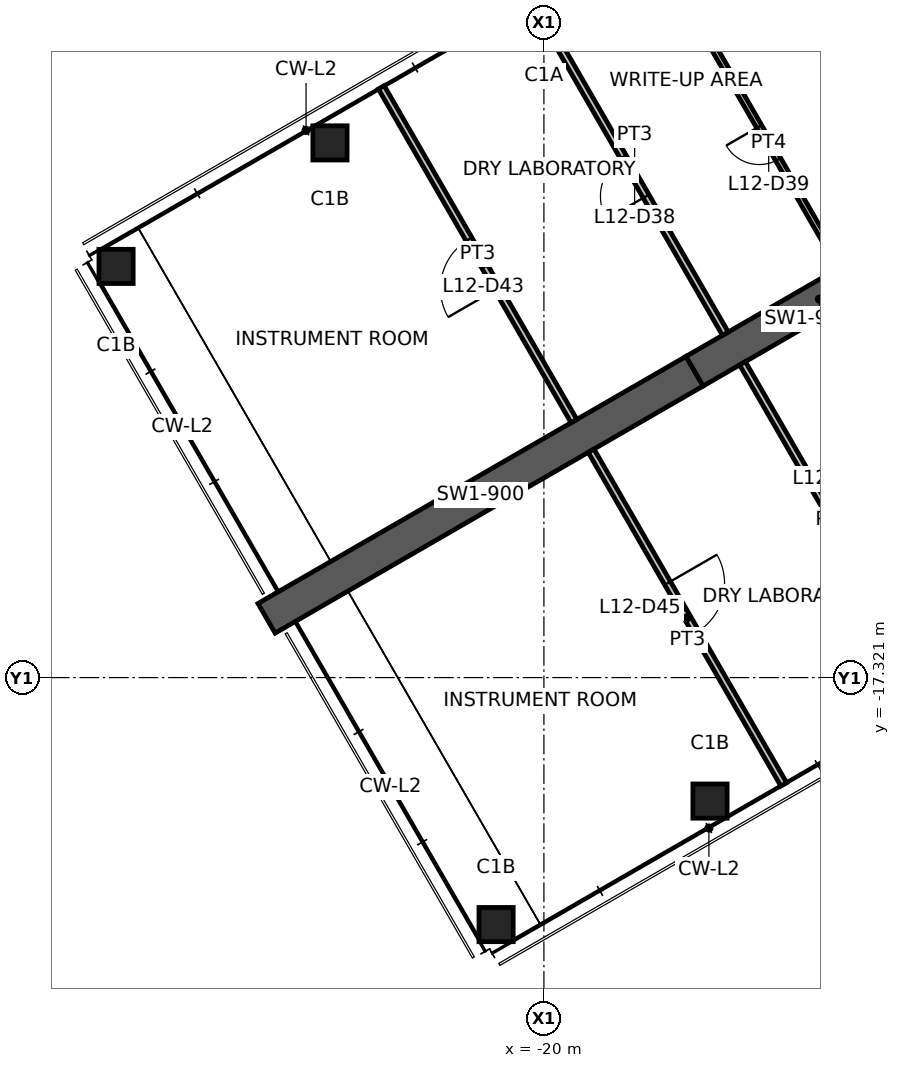
"""IFC4 building model, lengths in metres.
Left out: names, types, materials, properties, quantities, classifications, styles, units other than length and angle.
Written with IfcOpenShell. Run it as: python <this file> out.ifc"""

import sys

from ifc_helpers import new_model, si_unit, direction, frame, frame_2d, origin, origin_2d, place, context, subcontext, project, spatial, rectangle, hollow_rectangle, extrude, element, fill, save


model = new_model("IFC4")
c1 = context("Model", 3, precision=1e-05, world=origin(), true_north=direction((0.0, 1.0)))
c2 = subcontext(c1, "Body", "Model", "MODEL_VIEW")
j1 = project(units=[si_unit("LENGTHUNIT", "METRE"), si_unit("PLANEANGLEUNIT", "RADIAN")], contexts=[c1])
p1 = place(None, origin())
s1 = spatial("IfcSite", under=j1, at=p1, CompositionType="ELEMENT")
p2 = place(p1, origin())
s2 = spatial("IfcBuilding", under=s1, at=p2, CompositionType="ELEMENT")
p3 = place(p2, frame((0.0, 0.0, 47.8)))
s3 = spatial("IfcBuildingStorey", under=s2, at=p3, CompositionType="ELEMENT", Elevation=47.8)
for number, where, z_axis, x_axis in (
    (1, (-25.629, -3.25, 0.0), (0.0, 0.0, 1.0), (1.0, 0.0, 0.0)),
    (2, (-31.258, -6.5, 0.0), (0.0, 0.0, 1.0), (1.0, 0.0, 0.0)),
    (3, (-15.629, -20.571, 0.0), (0.0, 0.0, 1.0), (1.0, 0.0, 0.0)),
    (4, (-21.258, -23.821, 0.0), (0.0, 0.0, 1.0), (1.0, 0.0, 0.0)),
):
    element("IfcColumn", number, at=place(p3, frame(where, z_axis=z_axis, x_axis=x_axis)), inside=s3, PredefinedType="COLUMN", context=c2, shape_type="SweptSolid", body=[
        extrude(hollow_rectangle(XDim=0.9, YDim=0.9, WallThickness=0.05, at=origin_2d()), origin(), (0.0, 0.0, 1.0), 4.2),
    ])
p4 = place(p3, frame((-9.461, -5.462, 0.0), z_axis=(0.0, 0.0, 1.0), x_axis=(-0.866019116917, -0.500010889016, 0.0)))
e5 = element("IfcWall", 5, at=p4, inside=s3, PredefinedType="SHEAR", context=c2, shape_type="SweptSolid", body=[
    extrude(rectangle(XDim=7.595, YDim=0.9, at=frame_2d((3.798, 0.0))), origin(), (0.0, 0.0, 1.0), 4.2),
])
p5 = place(p4, frame((0.8, 0.0, 0.0)))
e6 = element("IfcOpeningElement", 6, at=p5, cuts=e5, PredefinedType="OPENING", context=c2, shape_type="SweptSolid", body=[
    extrude(rectangle(XDim=1.0, YDim=2.1, at=frame_2d((0.5, 1.05))), frame((0.0, 0.46, 0.0), z_axis=(0.0, -1.0, 0.0), x_axis=(1.0, 0.0, 0.0)), (0.0, 0.0, 1.0), 0.92),
])
p6 = place(p3, frame((-16.039, -9.26, 0.0), z_axis=(0.0, 0.0, 1.0), x_axis=(-0.866024837091, -0.50000098154, 0.0)))
e7 = element("IfcWall", 7, at=p6, inside=s3, PredefinedType="SHEAR", context=c2, shape_type="SweptSolid", body=[
    extrude(rectangle(XDim=13.0, YDim=0.9, at=frame_2d((6.5, 0.0))), origin(), (0.0, 0.0, 1.0), 4.2),
])
p7 = place(p3, frame((-15.225, -8.271, 0.0), z_axis=(0.0, 0.0, 1.0), x_axis=(-0.499993908199, 0.866028920859, 0.0)))
e8 = element("IfcWall", 8, at=p7, inside=s3, PredefinedType="PARTITIONING", context=c2, shape_type="SweptSolid", body=[
    extrude(rectangle(XDim=9.55, YDim=0.175, at=frame_2d((4.775, 0.0))), origin(), (0.0, 0.0, 1.0), 2.95),
])
p8 = place(p7, frame((4.175, 0.0, 0.0)))
e9 = element("IfcOpeningElement", 9, at=p8, cuts=e8, PredefinedType="OPENING", context=c2, shape_type="SweptSolid", body=[
    extrude(rectangle(XDim=1.2, YDim=2.1, at=frame_2d((0.6, 1.05))), frame((0.0, 0.098, 0.0), z_axis=(0.0, -1.0, 0.0), x_axis=(1.0, 0.0, 0.0)), (0.0, 0.0, 1.0), 0.195),
])
p9 = place(p3, frame((-12.208, -6.506, 0.0), z_axis=(0.0, 0.0, 1.0), x_axis=(-0.499984092097, 0.866034588021, 0.0)))
e10 = element("IfcWall", 10, at=p9, inside=s3, PredefinedType="PARTITIONING", context=c2, shape_type="SweptSolid", body=[
    extrude(rectangle(XDim=7.512, YDim=0.15, at=frame_2d((3.756, 0.0))), origin(), (0.0, 0.0, 1.0), 2.65),
])
p10 = place(p9, frame((3.256, 0.0, 0.0)))
e11 = element("IfcOpeningElement", 11, at=p10, cuts=e10, PredefinedType="OPENING", context=c2, shape_type="SweptSolid", body=[
    extrude(rectangle(XDim=1.0, YDim=2.1, at=frame_2d((0.5, 1.05))), frame((0.0, 0.085, 0.0), z_axis=(0.0, -1.0, 0.0), x_axis=(1.0, 0.0, 0.0)), (0.0, 0.0, 1.0), 0.17),
])
p11 = place(p3, frame((-19.209, -10.571, 0.0), z_axis=(0.0, 0.0, 1.0), x_axis=(-0.500005203629, 0.866022399447, 0.0)))
e12 = element("IfcWall", 12, at=p11, inside=s3, PredefinedType="PARTITIONING", context=c2, shape_type="SweptSolid", body=[
    extrude(rectangle(XDim=10.14, YDim=0.175, at=frame_2d((5.07, 0.0))), origin(), (0.0, 0.0, 1.0), 3.95),
])
p12 = place(p11, frame((4.025, 0.0, 0.0)))
e13 = element("IfcOpeningElement", 13, at=p12, cuts=e12, PredefinedType="OPENING", context=c2, shape_type="SweptSolid", body=[
    extrude(rectangle(XDim=1.5, YDim=2.1, at=frame_2d((0.75, 1.05))), frame((0.0, 0.098, 0.0), z_axis=(0.0, -1.0, 0.0), x_axis=(1.0, 0.0, 0.0)), (0.0, 0.0, 1.0), 0.195),
])
p13 = place(p3, frame((-14.775, -9.05, 0.0), z_axis=(0.0, 0.0, 1.0), x_axis=(0.499993908199, -0.866028920859, 0.0)))
e14 = element("IfcWall", 14, at=p13, inside=s3, PredefinedType="PARTITIONING", context=c2, shape_type="SweptSolid", body=[
    extrude(rectangle(XDim=9.55, YDim=0.175, at=frame_2d((4.775, 0.0))), origin(), (0.0, 0.0, 1.0), 2.95),
])
p14 = place(p13, frame((4.175, 0.0, 0.0)))
e15 = element("IfcOpeningElement", 15, at=p14, cuts=e14, PredefinedType="OPENING", context=c2, shape_type="SweptSolid", body=[
    extrude(rectangle(XDim=1.2, YDim=2.1, at=frame_2d((0.6, 1.05))), frame((0.0, 0.098, 0.0), z_axis=(0.0, -1.0, 0.0), x_axis=(1.0, 0.0, 0.0)), (0.0, 0.0, 1.0), 0.195),
])
p15 = place(p3, frame((-18.759, -11.35, 0.0), z_axis=(0.0, 0.0, 1.0), x_axis=(0.500005203629, -0.866022399447, 0.0)))
e16 = element("IfcWall", 16, at=p15, inside=s3, PredefinedType="PARTITIONING", context=c2, shape_type="SweptSolid", body=[
    extrude(rectangle(XDim=10.14, YDim=0.175, at=frame_2d((5.07, 0.0))), origin(), (0.0, 0.0, 1.0), 3.95),
])
p16 = place(p15, frame((4.025, 0.0, 0.0)))
e17 = element("IfcOpeningElement", 17, at=p16, cuts=e16, PredefinedType="OPENING", context=c2, shape_type="SweptSolid", body=[
    extrude(rectangle(XDim=1.5, YDim=2.1, at=frame_2d((0.75, 1.05))), frame((0.0, 0.098, 0.0), z_axis=(0.0, -1.0, 0.0), x_axis=(1.0, 0.0, 0.0)), (0.0, 0.0, 1.0), 0.195),
])
p17 = place(p8, origin())
e18 = element("IfcDoor", 18, at=p17, inside=s3, OperationType="DOUBLE_DOOR_SINGLE_SWING", PredefinedType="DOOR", context=c2, shape_type="SweptSolid", body=[
    extrude(rectangle(XDim=1.2, YDim=2.1, at=frame_2d((0.6, 1.05))), frame((0.0, 0.025, 0.0), z_axis=(0.0, -1.0, 0.0), x_axis=(1.0, 0.0, 0.0)), (0.0, 0.0, 1.0), 0.05),
])
fill(e9, e18)
p18 = place(p10, origin())
e19 = element("IfcDoor", 19, at=p18, inside=s3, OperationType="SINGLE_SWING_RIGHT", PredefinedType="DOOR", context=c2, shape_type="SweptSolid", body=[
    extrude(rectangle(XDim=1.0, YDim=2.1, at=frame_2d((0.5, 1.05))), frame((0.0, 0.025, 0.0), z_axis=(0.0, -1.0, 0.0), x_axis=(1.0, 0.0, 0.0)), (0.0, 0.0, 1.0), 0.05),
])
fill(e11, e19)
p19 = place(p12, origin())
e20 = element("IfcDoor", 20, at=p19, inside=s3, OperationType="DOUBLE_DOOR_SINGLE_SWING", PredefinedType="DOOR", context=c2, shape_type="SweptSolid", body=[
    extrude(rectangle(XDim=1.5, YDim=2.1, at=frame_2d((0.75, 1.05))), frame((0.0, 0.025, 0.0), z_axis=(0.0, -1.0, 0.0), x_axis=(1.0, 0.0, 0.0)), (0.0, 0.0, 1.0), 0.05),
])
fill(e13, e20)
p20 = place(p16, origin())
e21 = element("IfcDoor", 21, at=p20, inside=s3, OperationType="DOUBLE_DOOR_SINGLE_SWING", PredefinedType="DOOR", context=c2, shape_type="SweptSolid", body=[
    extrude(rectangle(XDim=1.5, YDim=2.1, at=frame_2d((0.75, 1.05))), frame((0.0, 0.025, 0.0), z_axis=(0.0, -1.0, 0.0), x_axis=(1.0, 0.0, 0.0)), (0.0, 0.0, 1.0), 0.05),
])
fill(e17, e21)
save(model, sys.argv[1])
